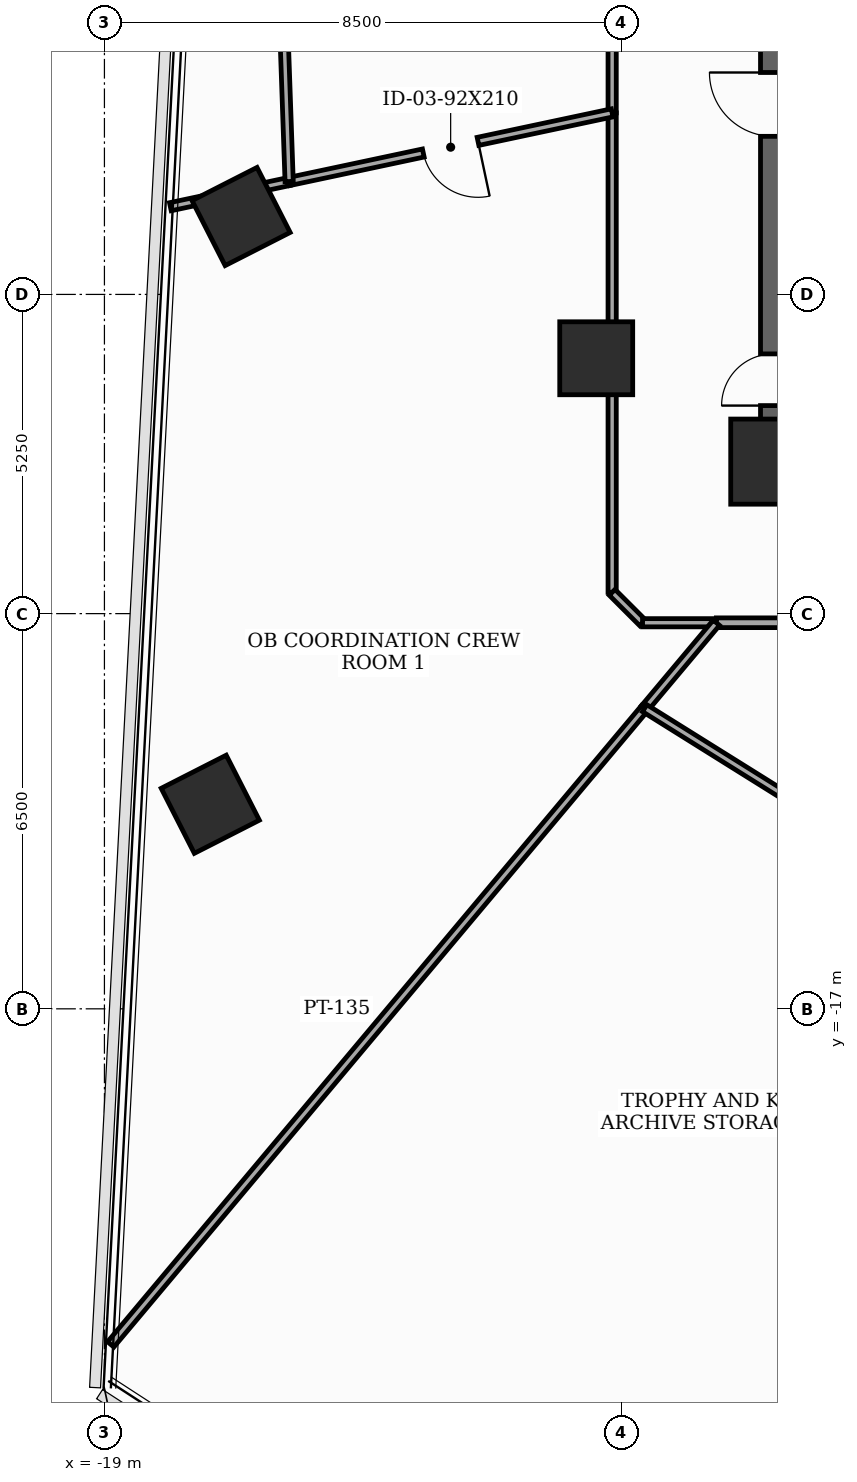
"""IFC4 building model, lengths in metres.
Left out: names, types, materials, properties, quantities, classifications, styles, units other than length and angle.
Written with IfcOpenShell. Run it as: python <this file> out.ifc"""

import sys

from ifc_helpers import new_model, si_unit, direction, frame, frame_2d, origin, origin_2d, place, context, subcontext, project, spatial, rectangle, extrude, element, fill, save


model = new_model("IFC4")
c1 = context("Model", 3, precision=1e-05, world=origin(), true_north=direction((0.0, 1.0)))
c2 = subcontext(c1, "Body", "Model", "MODEL_VIEW")
j1 = project(units=[si_unit("LENGTHUNIT", "METRE"), si_unit("PLANEANGLEUNIT", "RADIAN")], contexts=[c1])
p1 = place(None, origin())
s1 = spatial("IfcSite", under=j1, at=p1, CompositionType="ELEMENT")
p2 = place(p1, origin())
s2 = spatial("IfcBuilding", under=s1, at=p2, CompositionType="ELEMENT")
p3 = place(p2, frame((0.0, 0.0, 123.6)))
s3 = spatial("IfcBuildingStorey", under=s2, at=p3, CompositionType="ELEMENT", Elevation=123.6)
p4 = place(p3, frame((-8.0, -8.0, 0.0), z_axis=(0.0, 0.0, 1.0), x_axis=(1.0, 0.0, 0.0)))
e1 = element("IfcColumn", 1, at=p4, inside=s3, PredefinedType="COLUMN", context=c2, shape_type="SweptSolid", body=[
    extrude(rectangle(XDim=1.4, YDim=1.4, at=origin_2d()), origin(), (0.0, 0.0, 1.0), 3.7),
])
for number, where, z_axis, x_axis in (
    (2, (-10.912, -6.3, 0.0), (0.0, 0.0, 1.0), (1.0, 0.0, 0.0)),
    (3, (-16.752, -3.969, 0.0), (0.0, 0.0, 1.0), (0.891, 0.454, 0.0)),
    (4, (-17.259, -13.635, 0.0), (0.0, 0.0, 1.0), (0.891, 0.454, 0.0)),
):
    element("IfcColumn", number, at=place(p3, frame(where, z_axis=z_axis, x_axis=x_axis)), inside=s3, PredefinedType="COLUMN", context=c2, shape_type="SweptSolid", body=[
        extrude(rectangle(XDim=1.2, YDim=1.2, at=origin_2d()), origin(), (0.0, 0.0, 1.0), 3.7),
    ])
p5 = place(p3, frame((-8.0, -8.0, 0.0), z_axis=(0.0, 0.0, 1.0), x_axis=(0.0, 1.0, 0.0)))
e5 = element("IfcWall", 5, at=p5, inside=s3, PredefinedType="SHEAR", context=c2, shape_type="SweptSolid", body=[
    extrude(rectangle(XDim=16.0, YDim=0.42, at=frame_2d((8.0, 0.0))), origin(), (0.0, 0.0, 1.0), 3.5),
])
p6 = place(p5, frame((0.922, 0.0, 0.0)))
e6 = element("IfcOpeningElement", 6, at=p6, cuts=e5, PredefinedType="OPENING", context=c2, shape_type="SweptSolid", body=[
    extrude(rectangle(XDim=0.85, YDim=2.02, at=frame_2d((0.425, 1.01))), frame((0.0, 0.22, 0.0), z_axis=(0.0, -1.0, 0.0), x_axis=(1.0, 0.0, 0.0)), (0.0, 0.0, 1.0), 0.44),
])
p7 = place(p5, frame((5.35, 0.0, 0.0)))
e7 = element("IfcOpeningElement", 7, at=p7, cuts=e5, PredefinedType="OPENING", context=c2, shape_type="SweptSolid", body=[
    extrude(rectangle(XDim=1.05, YDim=2.15, at=frame_2d((0.525, 1.075))), frame((0.0, 0.22, 0.0), z_axis=(0.0, -1.0, 0.0), x_axis=(1.0, 0.0, 0.0)), (0.0, 0.0, 1.0), 0.44),
])
p8 = place(p3, frame((-8.0, -8.0, 0.0), z_axis=(0.0, 0.0, 1.0), x_axis=(1.0, 0.0, 0.0)))
e8 = element("IfcWall", 8, at=p8, inside=s3, PredefinedType="SHEAR", context=c2, shape_type="SweptSolid", body=[
    extrude(rectangle(XDim=16.0, YDim=0.42, at=frame_2d((8.0, 0.0))), origin(), (0.0, 0.0, 1.0), 3.5),
])
p9 = place(p8, frame((7.52, 0.0, 0.0)))
e9 = element("IfcOpeningElement", 9, at=p9, cuts=e8, PredefinedType="OPENING", context=c2, shape_type="SweptSolid", body=[
    extrude(rectangle(XDim=0.95, YDim=2.1, at=frame_2d((0.475, 1.05))), frame((0.0, 0.22, 0.0), z_axis=(0.0, -1.0, 0.0), x_axis=(1.0, 0.0, 0.0)), (0.0, 0.0, 1.0), 0.44),
])
p10 = place(p3, frame((-10.65, -2.264, 0.0), z_axis=(0.0, 0.0, 1.0), x_axis=(0.0, -1.0, 0.0)))
e10 = element("IfcWall", 10, at=p10, inside=s3, PredefinedType="PARTITIONING", context=c2, shape_type="SweptSolid", body=[
    extrude(rectangle(XDim=7.886, YDim=0.135, at=frame_2d((3.943, 0.0))), origin(), (0.0, 0.0, 1.0), 2.785),
])
p11 = place(p3, frame((-10.65, -10.15, 0.0), z_axis=(0.0, 0.0, 1.0), x_axis=(0.707106781187, -0.707106781187, 0.0)))
e11 = element("IfcWall", 11, at=p11, inside=s3, PredefinedType="PARTITIONING", context=c2, shape_type="SweptSolid", body=[
    extrude(rectangle(XDim=0.707, YDim=0.135, at=frame_2d((0.354, 0.0))), origin(), (0.0, 0.0, 1.0), 3.5),
])
p12 = place(p3, frame((-10.15, -10.65, 0.0), z_axis=(0.0, 0.0, 1.0), x_axis=(1.0, 0.0, 0.0)))
e12 = element("IfcWall", 12, at=p12, inside=s3, PredefinedType="PARTITIONING", context=c2, shape_type="SweptSolid", body=[
    extrude(rectangle(XDim=1.214, YDim=0.135, at=frame_2d((0.607, 0.0))), origin(), (0.0, 0.0, 1.0), 3.5),
])
p13 = place(p3, frame((-8.936, -10.65, 0.0), z_axis=(0.0, 0.0, 1.0), x_axis=(1.0, 0.0, 0.0)))
e13 = element("IfcWall", 13, at=p13, inside=s3, PredefinedType="PARTITIONING", context=c2, shape_type="SweptSolid", body=[
    extrude(rectangle(XDim=11.591, YDim=0.16, at=frame_2d((5.795, 0.0))), origin(), (0.0, 0.0, 1.0), 2.785),
])
p14 = place(p13, frame((5.295, 0.0, 0.0)))
e14 = element("IfcOpeningElement", 14, at=p14, cuts=e13, PredefinedType="OPENING", context=c2, shape_type="SweptSolid", body=[
    extrude(rectangle(XDim=1.0, YDim=2.15, at=frame_2d((0.5, 1.075))), frame((0.0, 0.09, 0.0), z_axis=(0.0, -1.0, 0.0), x_axis=(1.0, 0.0, 0.0)), (0.0, 0.0, 1.0), 0.18),
])
p15 = place(p3, frame((-10.65, 10.15, 0.0), z_axis=(0.0, 0.0, 1.0), x_axis=(0.0, -1.0, 0.0)))
e15 = element("IfcWall", 15, at=p15, inside=s3, PredefinedType="PARTITIONING", context=c2, shape_type="SweptSolid", body=[
    extrude(rectangle(XDim=12.414, YDim=0.135, at=frame_2d((6.207, 0.0))), origin(), (0.0, 0.0, 1.0), 2.785),
])
p16 = place(p15, frame((7.222, 0.0, 0.0)))
e16 = element("IfcOpeningElement", 16, at=p16, cuts=e15, PredefinedType="OPENING", context=c2, shape_type="SweptSolid", body=[
    extrude(rectangle(XDim=0.95, YDim=2.1, at=frame_2d((0.475, 1.05))), frame((0.0, 0.077, 0.0), z_axis=(0.0, -1.0, 0.0), x_axis=(1.0, 0.0, 0.0)), (0.0, 0.0, 1.0), 0.155),
])
p17 = place(p3, frame((-18.896, -22.52, 0.0), z_axis=(0.0, 0.0, 1.0), x_axis=(0.642815636807, 0.766020924698, 0.0)))
e17 = element("IfcWall", 17, at=p17, inside=s3, PredefinedType="PARTITIONING", context=c2, shape_type="SweptSolid", body=[
    extrude(rectangle(XDim=13.661, YDim=0.135, at=frame_2d((6.831, 0.0))), origin(), (0.0, 0.0, 1.0), 2.985),
])
p18 = place(p3, frame((-10.115, -12.055, 0.0), z_axis=(0.0, 0.0, 1.0), x_axis=(0.64278617419, 0.766045647642, 0.0)))
e18 = element("IfcWall", 18, at=p18, inside=s3, PredefinedType="PARTITIONING", context=c2, shape_type="SweptSolid", body=[
    extrude(rectangle(XDim=1.834, YDim=0.135, at=frame_2d((0.917, 0.0))), origin(), (0.0, 0.0, 1.0), 3.5),
])
p19 = place(p3, frame((-15.962, -3.393, 0.0), z_axis=(0.0, 0.0, 1.0), x_axis=(-0.978224349737, -0.207550286874, 0.0)))
e19 = element("IfcWall", 19, at=p19, inside=s3, PredefinedType="PARTITIONING", context=c2, shape_type="SweptSolid", body=[
    extrude(rectangle(XDim=1.997, YDim=0.135, at=frame_2d((0.999, 0.0))), origin(), (0.0, 0.0, 1.0), 2.885),
])
p20 = place(p3, frame((-10.65, -2.264, 0.0), z_axis=(0.0, 0.0, 1.0), x_axis=(-0.978145824013, -0.207920049456, 0.0)))
e20 = element("IfcWall", 20, at=p20, inside=s3, PredefinedType="PARTITIONING", context=c2, shape_type="SweptSolid", body=[
    extrude(rectangle(XDim=5.431, YDim=0.135, at=frame_2d((2.715, 0.0))), origin(), (0.0, 0.0, 1.0), 2.785),
])
p21 = place(p20, frame((2.255, 0.0, 0.0)))
e21 = element("IfcOpeningElement", 21, at=p21, cuts=e20, PredefinedType="OPENING", context=c2, shape_type="SweptSolid", body=[
    extrude(rectangle(XDim=0.92, YDim=2.1, at=frame_2d((0.46, 1.05))), frame((0.0, 0.077, 0.0), z_axis=(0.0, -1.0, 0.0), x_axis=(1.0, 0.0, 0.0)), (0.0, 0.0, 1.0), 0.155),
])
p22 = place(p3, frame((-6.046, -14.597, 0.0), z_axis=(0.0, 0.0, 1.0), x_axis=(-0.848109776096, 0.529820542912, 0.0)))
e22 = element("IfcWall", 22, at=p22, inside=s3, PredefinedType="PARTITIONING", context=c2, shape_type="SweptSolid", body=[
    extrude(rectangle(XDim=4.798, YDim=0.135, at=frame_2d((2.399, 0.0))), origin(), (0.0, 0.0, 1.0), 3.5),
])
p23 = place(p3, frame((-15.962, -3.393, 0.0), z_axis=(0.0, 0.0, 1.0), x_axis=(-0.034918259019, 0.999390171648, 0.0)))
e23 = element("IfcWall", 23, at=p23, inside=s3, PredefinedType="PARTITIONING", context=c2, shape_type="SweptSolid", body=[
    extrude(rectangle(XDim=6.104, YDim=0.135, at=frame_2d((3.052, 0.0))), origin(), (0.0, 0.0, 1.0), 2.885),
])
p24 = place(p6, origin())
e24 = element("IfcDoor", 24, at=p24, inside=s3, OperationType="SINGLE_SWING_LEFT", PredefinedType="TRAPDOOR", context=c2, shape_type="SweptSolid", body=[
    extrude(rectangle(XDim=0.85, YDim=2.02, at=frame_2d((0.425, 1.01))), frame((0.0, 0.025, 0.0), z_axis=(0.0, -1.0, 0.0), x_axis=(1.0, 0.0, 0.0)), (0.0, 0.0, 1.0), 0.05),
])
fill(e6, e24)
p25 = place(p7, origin())
e25 = element("IfcDoor", 25, at=p25, inside=s3, OperationType="SINGLE_SWING_RIGHT", PredefinedType="DOOR", context=c2, shape_type="SweptSolid", body=[
    extrude(rectangle(XDim=1.05, YDim=2.15, at=frame_2d((0.525, 1.075))), frame((0.0, 0.025, 0.0), z_axis=(0.0, -1.0, 0.0), x_axis=(1.0, 0.0, 0.0)), (0.0, 0.0, 1.0), 0.05),
])
fill(e7, e25)
p26 = place(p21, origin())
e26 = element("IfcDoor", 26, at=p26, inside=s3, OperationType="SINGLE_SWING_LEFT", PredefinedType="DOOR", context=c2, shape_type="SweptSolid", body=[
    extrude(rectangle(XDim=0.92, YDim=2.1, at=frame_2d((0.46, 1.05))), frame((0.0, 0.025, 0.0), z_axis=(0.0, -1.0, 0.0), x_axis=(1.0, 0.0, 0.0)), (0.0, 0.0, 1.0), 0.05),
])
fill(e21, e26)
save(model, sys.argv[1])
